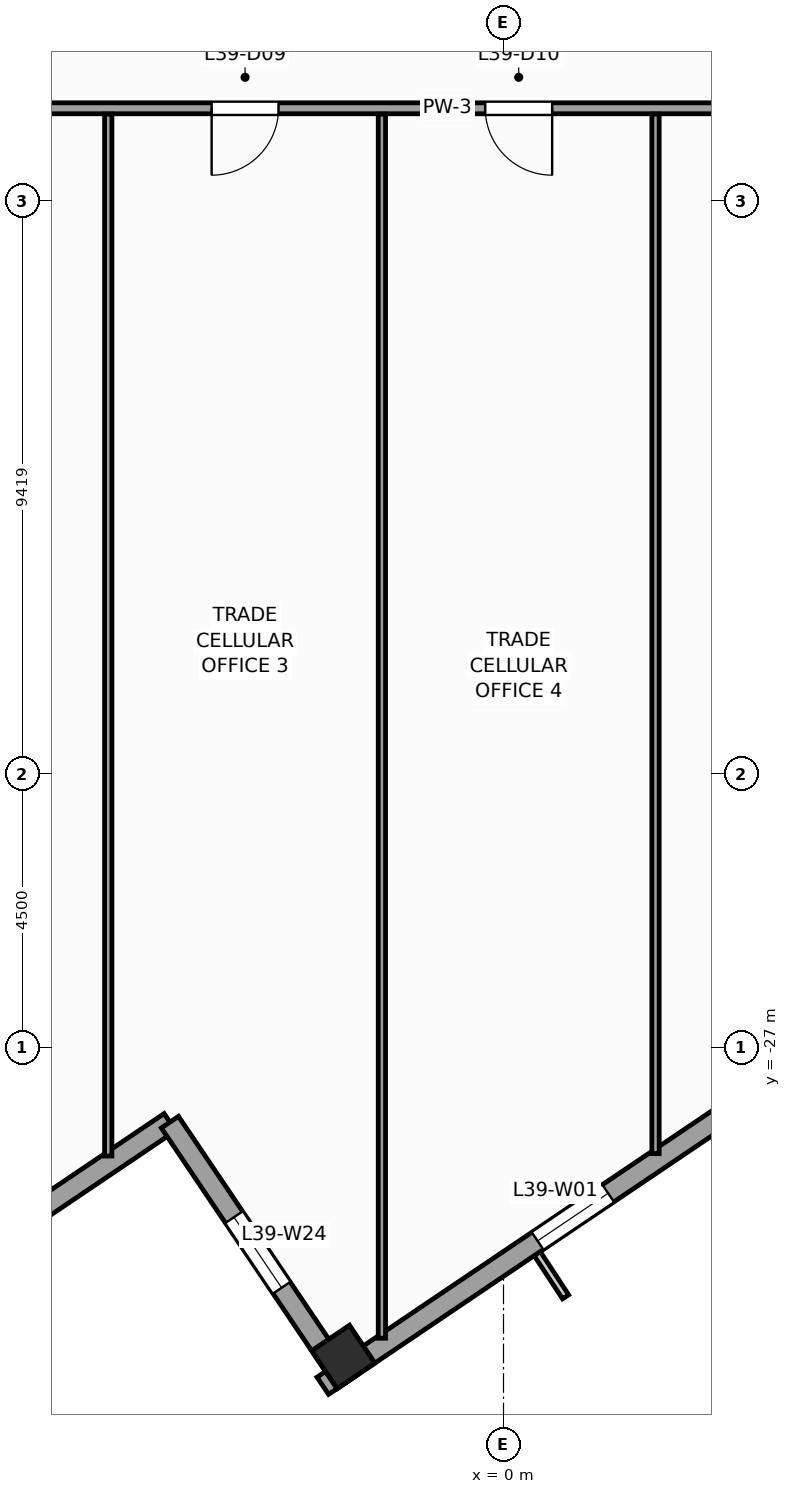
"""IFC4 building model, lengths in metres.
Left out: names, types, materials, properties, quantities, classifications, styles, units other than length and angle.
Written with IfcOpenShell. Run it as: python <this file> out.ifc"""

import sys

from ifc_helpers import new_model, si_unit, direction, frame, frame_2d, origin, origin_2d, place, context, subcontext, project, spatial, rectangle, extrude, source, transform, mapped, element, fill, save


model = new_model("IFC4")
c1 = context("Model", 3, precision=1e-05, world=origin(), true_north=direction((0.0, 1.0)))
c2 = subcontext(c1, "Body", "Model", "MODEL_VIEW")
j1 = project(units=[si_unit("LENGTHUNIT", "METRE"), si_unit("PLANEANGLEUNIT", "RADIAN")], contexts=[c1])
p1 = place(None, origin())
s1 = spatial("IfcSite", under=j1, at=p1, CompositionType="ELEMENT")
p2 = place(p1, origin())
s2 = spatial("IfcBuilding", under=s1, at=p2, CompositionType="ELEMENT")
p3 = place(p2, frame((0.0, 0.0, 164.4)))
s3 = spatial("IfcBuildingStorey", under=s2, at=p3, CompositionType="ELEMENT", Elevation=164.4)
m1 = source(origin(), c2, "Body", "SweptSolid", [
    extrude(rectangle(XDim=0.75, YDim=0.75, at=origin_2d()), origin(), (0.0, 0.0, 1.0), 4.0),
])
p4 = place(p3, frame((-2.635, -32.083, 0.0), z_axis=(0.0, 0.0, 1.0), x_axis=(0.829037572555, 0.559192903471, 0.0)))
e1 = element("IfcColumn", 1, at=p4, inside=s3, PredefinedType="COLUMN", context=c2, shape_type="MappedRepresentation", body=[
    mapped(m1, transform((0.0, 0.0, 0.0), scale=1.0)),
])
p5 = place(p3, frame((-2.972, -32.558, 0.0), z_axis=(0.0, 0.0, 1.0), x_axis=(0.829036218961, 0.559194910251, 0.0)))
e2 = element("IfcWall", 2, at=p5, inside=s3, PredefinedType="STANDARD", context=c2, shape_type="SweptSolid", body=[
    extrude(rectangle(XDim=41.34, YDim=0.34, at=frame_2d((20.67, 0.0))), origin(), (0.0, 0.0, 1.0), 3.04),
])
p6 = place(p5, frame((14.545, 0.0, 0.0)))
e3 = element("IfcOpeningElement", 3, at=p6, cuts=e2, PredefinedType="OPENING", context=c2, shape_type="SweptSolid", body=[
    extrude(rectangle(XDim=1.05, YDim=2.25, at=frame_2d((0.525, 1.125))), frame((0.0, 0.18, 0.0), z_axis=(0.0, -1.0, 0.0), x_axis=(1.0, 0.0, 0.0)), (0.0, 0.0, 1.0), 0.36),
])
p7 = place(p5, frame((4.261, 0.0, 0.56)))
e4 = element("IfcOpeningElement", 4, at=p7, cuts=e2, PredefinedType="OPENING", context=c2, shape_type="SweptSolid", body=[
    extrude(rectangle(XDim=1.4, YDim=2.4, at=frame_2d((0.7, 1.2))), frame((0.0, 0.18, 0.0), z_axis=(0.0, -1.0, 0.0), x_axis=(1.0, 0.0, 0.0)), (0.0, 0.0, 1.0), 0.36),
])
p8 = place(p5, frame((9.564, 0.0, 0.61)))
e5 = element("IfcOpeningElement", 5, at=p8, cuts=e2, PredefinedType="OPENING", context=c2, shape_type="SweptSolid", body=[
    extrude(rectangle(XDim=1.85, YDim=2.35, at=frame_2d((0.925, 1.175))), frame((0.0, 0.18, 0.0), z_axis=(0.0, -1.0, 0.0), x_axis=(1.0, 0.0, 0.0)), (0.0, 0.0, 1.0), 0.36),
])
p9 = place(p5, frame((16.668, 0.0, 0.61)))
e6 = element("IfcOpeningElement", 6, at=p9, cuts=e2, PredefinedType="OPENING", context=c2, shape_type="SweptSolid", body=[
    extrude(rectangle(XDim=1.85, YDim=2.35, at=frame_2d((0.925, 1.175))), frame((0.0, 0.18, 0.0), z_axis=(0.0, -1.0, 0.0), x_axis=(1.0, 0.0, 0.0)), (0.0, 0.0, 1.0), 0.36),
])
p10 = place(p5, frame((27.186, 0.0, 0.61)))
e7 = element("IfcOpeningElement", 7, at=p10, cuts=e2, PredefinedType="OPENING", context=c2, shape_type="SweptSolid", body=[
    extrude(rectangle(XDim=1.85, YDim=2.35, at=frame_2d((0.925, 1.175))), frame((0.0, 0.18, 0.0), z_axis=(0.0, -1.0, 0.0), x_axis=(1.0, 0.0, 0.0)), (0.0, 0.0, 1.0), 0.36),
])
p11 = place(p5, frame((34.852, 0.0, 0.56)))
e8 = element("IfcOpeningElement", 8, at=p11, cuts=e2, PredefinedType="OPENING", context=c2, shape_type="SweptSolid", body=[
    extrude(rectangle(XDim=1.4, YDim=2.4, at=frame_2d((0.7, 1.2))), frame((0.0, 0.18, 0.0), z_axis=(0.0, -1.0, 0.0), x_axis=(1.0, 0.0, 0.0)), (0.0, 0.0, 1.0), 0.36),
])
p12 = place(p3, frame((-9.631, -31.019, 0.0), z_axis=(0.0, 0.0, 1.0), x_axis=(0.829025804298, 0.559210350234, 0.0)))
e9 = element("IfcWall", 9, at=p12, inside=s3, PredefinedType="STANDARD", context=c2, shape_type="SweptSolid", body=[
    extrude(rectangle(XDim=5.0, YDim=0.34, at=frame_2d((2.5, 0.0))), origin(), (0.0, 0.0, 1.0), 3.74),
])
p13 = place(p3, frame((-5.486, -28.223, 0.0), z_axis=(0.0, 0.0, 1.0), x_axis=(0.559171107879, -0.82905227345, 0.0)))
e10 = element("IfcWall", 10, at=p13, inside=s3, PredefinedType="STANDARD", context=c2, shape_type="SweptSolid", body=[
    extrude(rectangle(XDim=5.17, YDim=0.34, at=frame_2d((2.585, 0.0))), origin(), (0.0, 0.0, 1.0), 3.04),
])
p14 = place(p13, frame((1.885, 0.0, 0.56)))
e11 = element("IfcOpeningElement", 11, at=p14, cuts=e10, PredefinedType="OPENING", context=c2, shape_type="SweptSolid", body=[
    extrude(rectangle(XDim=1.4, YDim=2.4, at=frame_2d((0.7, 1.2))), frame((0.0, 0.18, 0.0), z_axis=(0.0, -1.0, 0.0), x_axis=(1.0, 0.0, 0.0)), (0.0, 0.0, 1.0), 0.36),
])
p15 = place(p3, frame((-11.55, -11.55, 0.0), z_axis=(0.0, 0.0, 1.0), x_axis=(1.0, 0.0, 0.0)))
e12 = element("IfcWall", 12, at=p15, inside=s3, PredefinedType="PARTITIONING", context=c2, shape_type="SweptSolid", body=[
    extrude(rectangle(XDim=22.0, YDim=0.18, at=frame_2d((11.0, 0.0))), origin(), (0.0, 0.0, 1.0), 3.74),
])
p16 = place(p15, frame((1.58, 0.0, 0.0)))
e13 = element("IfcOpeningElement", 13, at=p16, cuts=e12, PredefinedType="OPENING", context=c2, shape_type="SweptSolid", body=[
    extrude(rectangle(XDim=0.95, YDim=2.1, at=frame_2d((0.475, 1.05))), frame((0.0, 0.1, 0.0), z_axis=(0.0, -1.0, 0.0), x_axis=(1.0, 0.0, 0.0)), (0.0, 0.0, 1.0), 0.2),
])
p17 = place(p15, frame((6.75, 0.0, 0.0)))
e14 = element("IfcOpeningElement", 14, at=p17, cuts=e12, PredefinedType="OPENING", context=c2, shape_type="SweptSolid", body=[
    extrude(rectangle(XDim=1.1, YDim=2.2, at=frame_2d((0.55, 1.1))), frame((0.0, 0.1, 0.0), z_axis=(0.0, -1.0, 0.0), x_axis=(1.0, 0.0, 0.0)), (0.0, 0.0, 1.0), 0.2),
])
p18 = place(p15, frame((11.25, 0.0, 0.0)))
e15 = element("IfcOpeningElement", 15, at=p18, cuts=e12, PredefinedType="OPENING", context=c2, shape_type="SweptSolid", body=[
    extrude(rectangle(XDim=1.1, YDim=2.2, at=frame_2d((0.55, 1.1))), frame((0.0, 0.1, 0.0), z_axis=(0.0, -1.0, 0.0), x_axis=(1.0, 0.0, 0.0)), (0.0, 0.0, 1.0), 0.2),
])
p19 = place(p15, frame((15.75, 0.0, 0.0)))
e16 = element("IfcOpeningElement", 16, at=p19, cuts=e12, PredefinedType="OPENING", context=c2, shape_type="SweptSolid", body=[
    extrude(rectangle(XDim=1.1, YDim=2.2, at=frame_2d((0.55, 1.1))), frame((0.0, 0.1, 0.0), z_axis=(0.0, -1.0, 0.0), x_axis=(1.0, 0.0, 0.0)), (0.0, 0.0, 1.0), 0.2),
])
p20 = place(p15, frame((19.561, 0.0, 0.0)))
e17 = element("IfcOpeningElement", 17, at=p20, cuts=e12, PredefinedType="OPENING", context=c2, shape_type="SweptSolid", body=[
    extrude(rectangle(XDim=1.1, YDim=2.2, at=frame_2d((0.55, 1.1))), frame((0.0, 0.1, 0.0), z_axis=(0.0, -1.0, 0.0), x_axis=(1.0, 0.0, 0.0)), (0.0, 0.0, 1.0), 0.2),
])
p21 = place(p3, frame((-6.5, -28.78, 0.0), z_axis=(0.0, 0.0, 1.0), x_axis=(0.0, 1.0, 0.0)))
e18 = element("IfcWall", 18, at=p21, inside=s3, PredefinedType="PARTITIONING", context=c2, shape_type="SweptSolid", body=[
    extrude(rectangle(XDim=17.135, YDim=0.12, at=frame_2d((8.567, 0.0))), origin(), (0.0, 0.0, 1.0), 3.74),
])
p22 = place(p3, frame((-2.0, -31.776, 0.0), z_axis=(0.0, 0.0, 1.0), x_axis=(0.0, 1.0, 0.0)))
e19 = element("IfcWall", 19, at=p22, inside=s3, PredefinedType="PARTITIONING", context=c2, shape_type="SweptSolid", body=[
    extrude(rectangle(XDim=20.131, YDim=0.12, at=frame_2d((10.065, 0.0))), origin(), (0.0, 0.0, 1.0), 3.74),
])
p23 = place(p3, frame((2.5, -28.74, 0.0), z_axis=(0.0, 0.0, 1.0), x_axis=(0.0, 1.0, 0.0)))
e20 = element("IfcWall", 20, at=p23, inside=s3, PredefinedType="PARTITIONING", context=c2, shape_type="SweptSolid", body=[
    extrude(rectangle(XDim=17.095, YDim=0.12, at=frame_2d((8.548, 0.0))), origin(), (0.0, 0.0, 1.0), 3.74),
])
m2 = source(origin(), c2, "Body", "SweptSolid", [
    extrude(rectangle(XDim=1.4, YDim=2.4, at=frame_2d((0.7, 1.2))), frame((0.0, 0.03, 0.0), z_axis=(0.0, -1.0, 0.0), x_axis=(1.0, 0.0, 0.0)), (0.0, 0.0, 1.0), 0.06),
])
p24 = place(p7, origin())
e21 = element("IfcWindow", 21, at=p24, inside=s3, PartitioningType="SINGLE_PANEL", PredefinedType="WINDOW", context=c2, shape_type="MappedRepresentation", body=[
    mapped(m2, transform((0.0, 0.0, 0.0), scale=1.0)),
])
fill(e4, e21)
p25 = place(p14, origin())
e22 = element("IfcWindow", 22, at=p25, inside=s3, PartitioningType="SINGLE_PANEL", PredefinedType="WINDOW", context=c2, shape_type="MappedRepresentation", body=[
    mapped(m2, transform((0.0, 0.0, 0.0), scale=1.0)),
])
fill(e11, e22)
m3 = source(origin(), c2, "Body", "SweptSolid", [
    extrude(rectangle(XDim=1.1, YDim=2.2, at=frame_2d((0.55, 1.1))), frame((0.0, 0.025, 0.0), z_axis=(0.0, -1.0, 0.0), x_axis=(1.0, 0.0, 0.0)), (0.0, 0.0, 1.0), 0.05),
])
p26 = place(p17, frame((1.1, 0.0, 0.0), z_axis=(0.0, 0.0, 1.0), x_axis=(-1.0, 0.0, 0.0)))
e23 = element("IfcDoor", 23, at=p26, inside=s3, OperationType="SINGLE_SWING_LEFT", PredefinedType="DOOR", context=c2, shape_type="MappedRepresentation", body=[
    mapped(m3, transform((0.0, 0.0, 0.0), scale=1.0)),
])
fill(e14, e23)
p27 = place(p18, frame((1.1, 0.0, 0.0), z_axis=(0.0, 0.0, 1.0), x_axis=(-1.0, 0.0, 0.0)))
e24 = element("IfcDoor", 24, at=p27, inside=s3, OperationType="SINGLE_SWING_RIGHT", PredefinedType="DOOR", context=c2, shape_type="MappedRepresentation", body=[
    mapped(m3, transform((0.0, 0.0, 0.0), scale=1.0)),
])
fill(e15, e24)
save(model, sys.argv[1])
